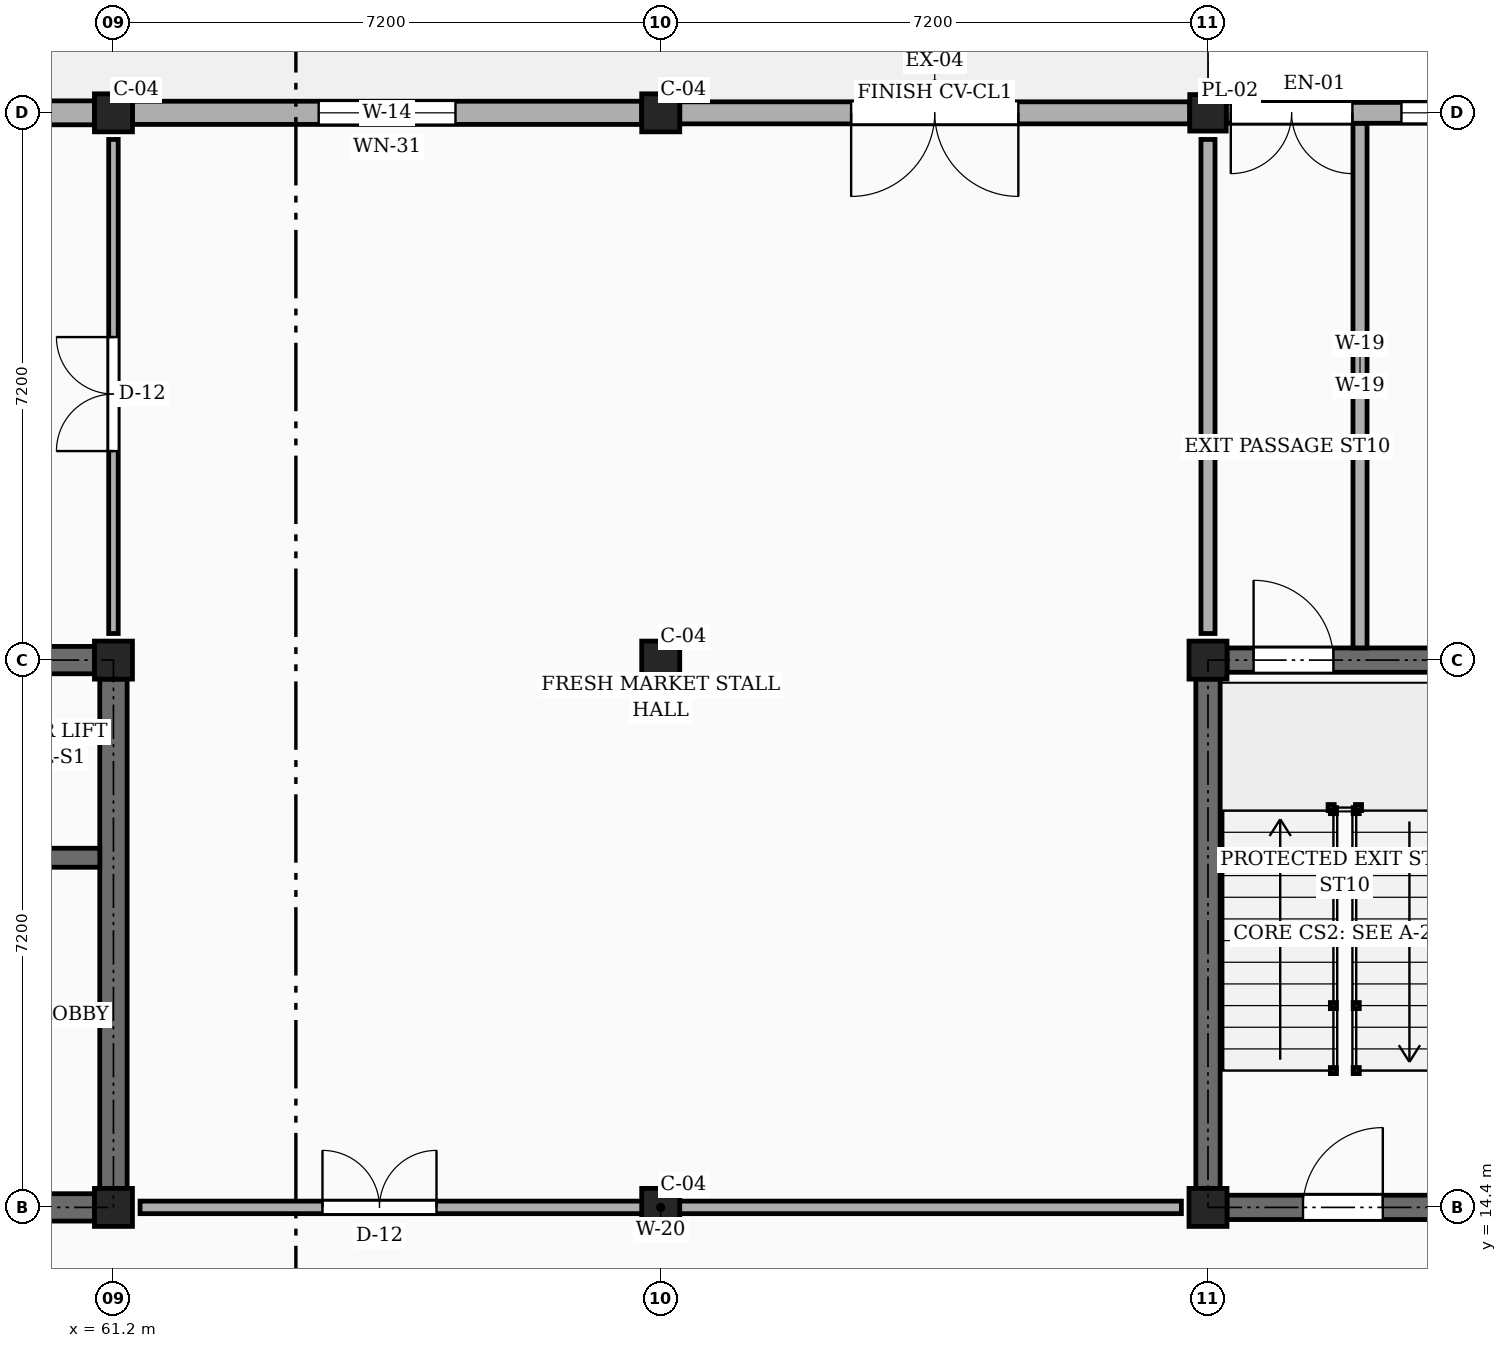
"""IFC4 building model, lengths in metres.
Left out: names, types, materials, properties, quantities, classifications, styles, units other than length and angle.
Written with IfcOpenShell. Run it as: python <this file> out.ifc"""

import sys

from ifc_helpers import new_model, si_unit, direction, frame, frame_2d, origin, origin_2d, place, context, subcontext, project, spatial, rectangle, extrude, element, fill, save


model = new_model("IFC4")
c1 = context("Model", 3, precision=1e-05, world=origin(), true_north=direction((0.0, 1.0)))
c2 = subcontext(c1, "Body", "Model", "MODEL_VIEW")
j1 = project(units=[si_unit("LENGTHUNIT", "METRE"), si_unit("PLANEANGLEUNIT", "RADIAN")], contexts=[c1])
p1 = place(None, origin())
s1 = spatial("IfcSite", under=j1, at=p1, CompositionType="ELEMENT")
p2 = place(p1, origin())
s2 = spatial("IfcBuilding", under=s1, at=p2, CompositionType="ELEMENT")
p3 = place(p2, origin())
s3 = spatial("IfcBuildingStorey", under=s2, at=p3, CompositionType="ELEMENT", Elevation=0.0)
for number, where, z_axis, x_axis in (
    (1, (61.2, 14.4, 0.0), (0.0, 0.0, 1.0), (1.0, 0.0, 0.0)),
    (2, (61.2, 21.6, 0.0), (0.0, 0.0, 1.0), (1.0, 0.0, 0.0)),
    (3, (61.2, 28.8, 0.0), (0.0, 0.0, 1.0), (1.0, 0.0, 0.0)),
    (4, (68.4, 14.4, 0.0), (0.0, 0.0, 1.0), (1.0, 0.0, 0.0)),
    (5, (68.4, 21.6, 0.0), (0.0, 0.0, 1.0), (1.0, 0.0, 0.0)),
    (6, (68.4, 28.8, 0.0), (0.0, 0.0, 1.0), (1.0, 0.0, 0.0)),
    (7, (75.6, 14.4, 0.0), (0.0, 0.0, 1.0), (1.0, 0.0, 0.0)),
    (8, (75.6, 21.6, 0.0), (0.0, 0.0, 1.0), (1.0, 0.0, 0.0)),
):
    element("IfcColumn", number, at=place(p3, frame(where, z_axis=z_axis, x_axis=x_axis)), inside=s3, PredefinedType="COLUMN", context=c2, shape_type="SweptSolid", body=[
        extrude(rectangle(XDim=0.5, YDim=0.5, at=origin_2d()), origin(), (0.0, 0.0, 1.0), 4.5),
    ])
p4 = place(p3, frame((75.6, 28.8, 0.0), z_axis=(0.0, 0.0, 1.0), x_axis=(1.0, 0.0, 0.0)))
e9 = element("IfcColumn", 9, at=p4, inside=s3, PredefinedType="PILASTER", context=c2, shape_type="SweptSolid", body=[
    extrude(rectangle(XDim=0.48, YDim=0.48, at=origin_2d()), origin(), (0.0, 0.0, 1.0), 4.5),
])
p5 = place(p3, frame((82.55, 28.8, 0.0), z_axis=(0.0, 0.0, 1.0), x_axis=(-1.0, 0.0, 0.0)))
e10 = element("IfcWall", 10, at=p5, inside=s3, PredefinedType="SOLIDWALL", context=c2, shape_type="SweptSolid", body=[
    extrude(rectangle(XDim=6.71, YDim=0.275, at=frame_2d((3.355, 0.0))), origin(), (0.0, 0.0, 1.0), 3.83),
])
p6 = place(p5, frame((2.305, 0.0, 0.85)))
e11 = element("IfcOpeningElement", 11, at=p6, cuts=e10, PredefinedType="OPENING", context=c2, shape_type="SweptSolid", body=[
    extrude(rectangle(XDim=2.1, YDim=2.1, at=frame_2d((1.05, 1.05))), frame((0.0, 0.147, 0.0), z_axis=(0.0, -1.0, 0.0), x_axis=(1.0, 0.0, 0.0)), (0.0, 0.0, 1.0), 0.295),
])
p7 = place(p5, frame((5.05, 0.0, 0.0)))
e12 = element("IfcOpeningElement", 12, at=p7, cuts=e10, PredefinedType="OPENING", context=c2, shape_type="SweptSolid", body=[
    extrude(rectangle(XDim=1.6, YDim=2.25, at=frame_2d((0.8, 1.125))), frame((0.0, 0.147, 0.0), z_axis=(0.0, -1.0, 0.0), x_axis=(1.0, 0.0, 0.0)), (0.0, 0.0, 1.0), 0.295),
])
p8 = place(p3, frame((75.36, 28.8, 0.0), z_axis=(0.0, 0.0, 1.0), x_axis=(-1.0, 0.0, 0.0)))
e13 = element("IfcWall", 13, at=p8, inside=s3, PredefinedType="SOLIDWALL", context=c2, shape_type="SweptSolid", body=[
    extrude(rectangle(XDim=6.71, YDim=0.29, at=frame_2d((3.355, 0.0))), origin(), (0.0, 0.0, 1.0), 3.83),
])
p9 = place(p8, frame((2.255, 0.0, 0.0)))
e14 = element("IfcOpeningElement", 14, at=p9, cuts=e13, PredefinedType="OPENING", context=c2, shape_type="SweptSolid", body=[
    extrude(rectangle(XDim=2.2, YDim=2.35, at=frame_2d((1.1, 1.175))), frame((0.0, 0.155, 0.0), z_axis=(0.0, -1.0, 0.0), x_axis=(1.0, 0.0, 0.0)), (0.0, 0.0, 1.0), 0.31),
])
p10 = place(p3, frame((68.15, 28.8, 0.0), z_axis=(0.0, 0.0, 1.0), x_axis=(-1.0, 0.0, 0.0)))
e15 = element("IfcWall", 15, at=p10, inside=s3, PredefinedType="SOLIDWALL", context=c2, shape_type="SweptSolid", body=[
    extrude(rectangle(XDim=6.7, YDim=0.305, at=frame_2d((3.35, 0.0))), origin(), (0.0, 0.0, 1.0), 3.83),
])
p11 = place(p10, frame((2.45, 0.0, 0.85)))
e16 = element("IfcOpeningElement", 16, at=p11, cuts=e15, PredefinedType="OPENING", context=c2, shape_type="SweptSolid", body=[
    extrude(rectangle(XDim=1.8, YDim=2.1, at=frame_2d((0.9, 1.05))), frame((0.0, 0.163, 0.0), z_axis=(0.0, -1.0, 0.0), x_axis=(1.0, 0.0, 0.0)), (0.0, 0.0, 1.0), 0.325),
])
p12 = place(p3, frame((60.95, 28.8, 0.0), z_axis=(0.0, 0.0, 1.0), x_axis=(-1.0, 0.0, 0.0)))
e17 = element("IfcWall", 17, at=p12, inside=s3, PredefinedType="SOLIDWALL", context=c2, shape_type="SweptSolid", body=[
    extrude(rectangle(XDim=6.71, YDim=0.315, at=frame_2d((3.355, 0.0))), origin(), (0.0, 0.0, 1.0), 3.83),
])
p13 = place(p12, frame((2.555, 0.0, 0.0)))
e18 = element("IfcOpeningElement", 18, at=p13, cuts=e17, PredefinedType="OPENING", context=c2, shape_type="SweptSolid", body=[
    extrude(rectangle(XDim=1.6, YDim=2.25, at=frame_2d((0.8, 1.125))), frame((0.0, 0.167, 0.0), z_axis=(0.0, -1.0, 0.0), x_axis=(1.0, 0.0, 0.0)), (0.0, 0.0, 1.0), 0.335),
])
p14 = place(p3, frame((54.25, 21.6, 0.0), z_axis=(0.0, 0.0, 1.0), x_axis=(1.0, 0.0, 0.0)))
e19 = element("IfcWall", 19, at=p14, inside=s3, PredefinedType="SHEAR", context=c2, shape_type="SweptSolid", body=[
    extrude(rectangle(XDim=6.7, YDim=0.36, at=frame_2d((3.35, 0.0))), origin(), (0.0, 0.0, 1.0), 4.26),
])
p15 = place(p3, frame((61.2, 14.65, 0.0), z_axis=(0.0, 0.0, 1.0), x_axis=(0.0, 1.0, 0.0)))
e20 = element("IfcWall", 20, at=p15, inside=s3, PredefinedType="SHEAR", context=c2, shape_type="SweptSolid", body=[
    extrude(rectangle(XDim=6.7, YDim=0.36, at=frame_2d((3.35, 0.0))), origin(), (0.0, 0.0, 1.0), 4.26),
])
p16 = place(p3, frame((54.25, 14.4, 0.0), z_axis=(0.0, 0.0, 1.0), x_axis=(1.0, 0.0, 0.0)))
e21 = element("IfcWall", 21, at=p16, inside=s3, PredefinedType="SHEAR", context=c2, shape_type="SweptSolid", body=[
    extrude(rectangle(XDim=6.7, YDim=0.36, at=frame_2d((3.35, 0.0))), origin(), (0.0, 0.0, 1.0), 4.26),
])
p17 = place(p16, frame((4.5, 0.0, 0.0)))
e22 = element("IfcOpeningElement", 22, at=p17, cuts=e21, PredefinedType="OPENING", context=c2, shape_type="SweptSolid", body=[
    extrude(rectangle(XDim=1.1, YDim=2.15, at=frame_2d((0.55, 1.075))), frame((0.0, 0.19, 0.0), z_axis=(0.0, -1.0, 0.0), x_axis=(1.0, 0.0, 0.0)), (0.0, 0.0, 1.0), 0.38),
])
p18 = place(p3, frame((57.725, 19.0, 0.0), z_axis=(0.0, 0.0, 1.0), x_axis=(1.0, 0.0, 0.0)))
e23 = element("IfcWall", 23, at=p18, inside=s3, PredefinedType="SHEAR", context=c2, shape_type="SweptSolid", body=[
    extrude(rectangle(XDim=3.295, YDim=0.25, at=frame_2d((1.647, 0.0))), origin(), (0.0, 0.0, 1.0), 4.26),
])
p19 = place(p18, frame((1.1, 0.0, 0.0)))
e24 = element("IfcOpeningElement", 24, at=p19, cuts=e23, PredefinedType="OPENING", context=c2, shape_type="SweptSolid", body=[
    extrude(rectangle(XDim=1.0, YDim=2.2, at=frame_2d((0.5, 1.1))), frame((0.0, 0.135, 0.0), z_axis=(0.0, -1.0, 0.0), x_axis=(1.0, 0.0, 0.0)), (0.0, 0.0, 1.0), 0.27),
])
p20 = place(p3, frame((75.6, 14.65, 0.0), z_axis=(0.0, 0.0, 1.0), x_axis=(0.0, 1.0, 0.0)))
e25 = element("IfcWall", 25, at=p20, inside=s3, PredefinedType="SHEAR", context=c2, shape_type="SweptSolid", body=[
    extrude(rectangle(XDim=6.7, YDim=0.32, at=frame_2d((3.35, 0.0))), origin(), (0.0, 0.0, 1.0), 4.26),
])
p21 = place(p3, frame((75.85, 21.6, 0.0), z_axis=(0.0, 0.0, 1.0), x_axis=(1.0, 0.0, 0.0)))
e26 = element("IfcWall", 26, at=p21, inside=s3, PredefinedType="SHEAR", context=c2, shape_type="SweptSolid", body=[
    extrude(rectangle(XDim=3.19, YDim=0.32, at=frame_2d((1.595, 0.0))), origin(), (0.0, 0.0, 1.0), 4.26),
])
p22 = place(p21, frame((0.35, 0.0, 0.0)))
e27 = element("IfcOpeningElement", 27, at=p22, cuts=e26, PredefinedType="OPENING", context=c2, shape_type="SweptSolid", body=[
    extrude(rectangle(XDim=1.05, YDim=2.15, at=frame_2d((0.525, 1.075))), frame((0.0, 0.17, 0.0), z_axis=(0.0, -1.0, 0.0), x_axis=(1.0, 0.0, 0.0)), (0.0, 0.0, 1.0), 0.34),
])
p23 = place(p3, frame((75.85, 14.4, 0.0), z_axis=(0.0, 0.0, 1.0), x_axis=(1.0, 0.0, 0.0)))
e28 = element("IfcWall", 28, at=p23, inside=s3, PredefinedType="SHEAR", context=c2, shape_type="SweptSolid", body=[
    extrude(rectangle(XDim=3.19, YDim=0.32, at=frame_2d((1.595, 0.0))), origin(), (0.0, 0.0, 1.0), 4.26),
])
p24 = place(p23, frame((1.0, 0.0, 0.0)))
e29 = element("IfcOpeningElement", 29, at=p24, cuts=e28, PredefinedType="OPENING", context=c2, shape_type="SweptSolid", body=[
    extrude(rectangle(XDim=1.05, YDim=2.15, at=frame_2d((0.525, 1.075))), frame((0.0, 0.17, 0.0), z_axis=(0.0, -1.0, 0.0), x_axis=(1.0, 0.0, 0.0)), (0.0, 0.0, 1.0), 0.34),
])
p25 = place(p3, frame((61.55, 14.4, 0.0), z_axis=(0.0, 0.0, 1.0), x_axis=(1.0, 0.0, 0.0)))
e30 = element("IfcWall", 30, at=p25, inside=s3, PredefinedType="PARTITIONING", context=c2, shape_type="SweptSolid", body=[
    extrude(rectangle(XDim=13.7, YDim=0.165, at=frame_2d((6.85, 0.0))), origin(), (0.0, 0.0, 1.0), 3.41),
])
p26 = place(p25, frame((2.4, 0.0, 0.0)))
e31 = element("IfcOpeningElement", 31, at=p26, cuts=e30, PredefinedType="OPENING", context=c2, shape_type="SweptSolid", body=[
    extrude(rectangle(XDim=1.5, YDim=2.25, at=frame_2d((0.75, 1.125))), frame((0.0, 0.093, 0.0), z_axis=(0.0, -1.0, 0.0), x_axis=(1.0, 0.0, 0.0)), (0.0, 0.0, 1.0), 0.185),
])
p27 = place(p3, frame((61.2, 21.95, 0.0), z_axis=(0.0, 0.0, 1.0), x_axis=(0.0, 1.0, 0.0)))
e32 = element("IfcWall", 32, at=p27, inside=s3, PredefinedType="PARTITIONING", context=c2, shape_type="SweptSolid", body=[
    extrude(rectangle(XDim=6.5, YDim=0.125, at=frame_2d((3.25, 0.0))), origin(), (0.0, 0.0, 1.0), 3.41),
])
p28 = place(p27, frame((2.4, 0.0, 0.0)))
e33 = element("IfcOpeningElement", 33, at=p28, cuts=e32, PredefinedType="OPENING", context=c2, shape_type="SweptSolid", body=[
    extrude(rectangle(XDim=1.5, YDim=2.25, at=frame_2d((0.75, 1.125))), frame((0.0, 0.073, 0.0), z_axis=(0.0, -1.0, 0.0), x_axis=(1.0, 0.0, 0.0)), (0.0, 0.0, 1.0), 0.145),
])
p29 = place(p3, frame((75.6, 21.95, 0.0), z_axis=(0.0, 0.0, 1.0), x_axis=(0.0, 1.0, 0.0)))
e34 = element("IfcWall", 34, at=p29, inside=s3, PredefinedType="PARTITIONING", context=c2, shape_type="SweptSolid", body=[
    extrude(rectangle(XDim=6.5, YDim=0.185, at=frame_2d((3.25, 0.0))), origin(), (0.0, 0.0, 1.0), 3.41),
])
p30 = place(p3, frame((77.6, 21.76, 0.0), z_axis=(0.0, 0.0, 1.0), x_axis=(0.0, 1.0, 0.0)))
e35 = element("IfcWall", 35, at=p30, inside=s3, PredefinedType="PARTITIONING", context=c2, shape_type="SweptSolid", body=[
    extrude(rectangle(XDim=6.9, YDim=0.185, at=frame_2d((3.45, 0.0))), origin(), (0.0, 0.0, 1.0), 3.41),
])
p31 = place(p6, origin())
e36 = element("IfcWindow", 36, at=p31, inside=s3, PartitioningType="SINGLE_PANEL", PredefinedType="WINDOW", context=c2, shape_type="SweptSolid", body=[
    extrude(rectangle(XDim=2.1, YDim=2.1, at=frame_2d((1.05, 1.05))), frame((0.0, 0.03, 0.0), z_axis=(0.0, -1.0, 0.0), x_axis=(1.0, 0.0, 0.0)), (0.0, 0.0, 1.0), 0.06),
])
fill(e11, e36)
p32 = place(p9, frame((2.2, 0.0, 0.0), z_axis=(0.0, 0.0, 1.0), x_axis=(-1.0, 0.0, 0.0)))
e37 = element("IfcDoor", 37, at=p32, inside=s3, OperationType="DOUBLE_DOOR_SINGLE_SWING", PredefinedType="DOOR", context=c2, shape_type="SweptSolid", body=[
    extrude(rectangle(XDim=2.2, YDim=2.35, at=frame_2d((1.1, 1.175))), frame((0.0, 0.025, 0.0), z_axis=(0.0, -1.0, 0.0), x_axis=(1.0, 0.0, 0.0)), (0.0, 0.0, 1.0), 0.05),
])
fill(e14, e37)
p33 = place(p11, origin())
e38 = element("IfcWindow", 38, at=p33, inside=s3, PartitioningType="SINGLE_PANEL", PredefinedType="WINDOW", context=c2, shape_type="SweptSolid", body=[
    extrude(rectangle(XDim=1.8, YDim=2.1, at=frame_2d((0.9, 1.05))), frame((0.0, 0.03, 0.0), z_axis=(0.0, -1.0, 0.0), x_axis=(1.0, 0.0, 0.0)), (0.0, 0.0, 1.0), 0.06),
])
fill(e16, e38)
p34 = place(p24, frame((1.05, 0.0, 0.0), z_axis=(0.0, 0.0, 1.0), x_axis=(-1.0, 0.0, 0.0)))
e39 = element("IfcDoor", 39, at=p34, inside=s3, OperationType="SINGLE_SWING_RIGHT", PredefinedType="DOOR", context=c2, shape_type="SweptSolid", body=[
    extrude(rectangle(XDim=1.05, YDim=2.15, at=frame_2d((0.525, 1.075))), frame((0.0, 0.025, 0.0), z_axis=(0.0, -1.0, 0.0), x_axis=(1.0, 0.0, 0.0)), (0.0, 0.0, 1.0), 0.05),
])
fill(e29, e39)
p35 = place(p26, origin())
e40 = element("IfcDoor", 40, at=p35, inside=s3, OperationType="DOUBLE_DOOR_SINGLE_SWING", PredefinedType="DOOR", context=c2, shape_type="SweptSolid", body=[
    extrude(rectangle(XDim=1.5, YDim=2.25, at=frame_2d((0.75, 1.125))), frame((0.0, 0.025, 0.0), z_axis=(0.0, -1.0, 0.0), x_axis=(1.0, 0.0, 0.0)), (0.0, 0.0, 1.0), 0.05),
])
fill(e31, e40)
p36 = place(p28, origin())
e41 = element("IfcDoor", 41, at=p36, inside=s3, OperationType="DOUBLE_DOOR_SINGLE_SWING", PredefinedType="DOOR", context=c2, shape_type="SweptSolid", body=[
    extrude(rectangle(XDim=1.5, YDim=2.25, at=frame_2d((0.75, 1.125))), frame((0.0, 0.025, 0.0), z_axis=(0.0, -1.0, 0.0), x_axis=(1.0, 0.0, 0.0)), (0.0, 0.0, 1.0), 0.05),
])
fill(e33, e41)
p37 = place(p22, origin())
e42 = element("IfcDoor", 42, at=p37, inside=s3, OperationType="SINGLE_SWING_LEFT", PredefinedType="DOOR", context=c2, shape_type="SweptSolid", body=[
    extrude(rectangle(XDim=1.05, YDim=2.15, at=frame_2d((0.525, 1.075))), frame((0.0, 0.025, 0.0), z_axis=(0.0, -1.0, 0.0), x_axis=(1.0, 0.0, 0.0)), (0.0, 0.0, 1.0), 0.05),
])
fill(e27, e42)
p38 = place(p7, frame((1.6, 0.0, 0.0), z_axis=(0.0, 0.0, 1.0), x_axis=(-1.0, 0.0, 0.0)))
e43 = element("IfcDoor", 43, at=p38, inside=s3, OperationType="DOUBLE_DOOR_SINGLE_SWING", PredefinedType="DOOR", context=c2, shape_type="SweptSolid", body=[
    extrude(rectangle(XDim=1.6, YDim=2.25, at=frame_2d((0.8, 1.125))), frame((0.0, 0.025, 0.0), z_axis=(0.0, -1.0, 0.0), x_axis=(1.0, 0.0, 0.0)), (0.0, 0.0, 1.0), 0.05),
])
fill(e12, e43)
save(model, sys.argv[1])
